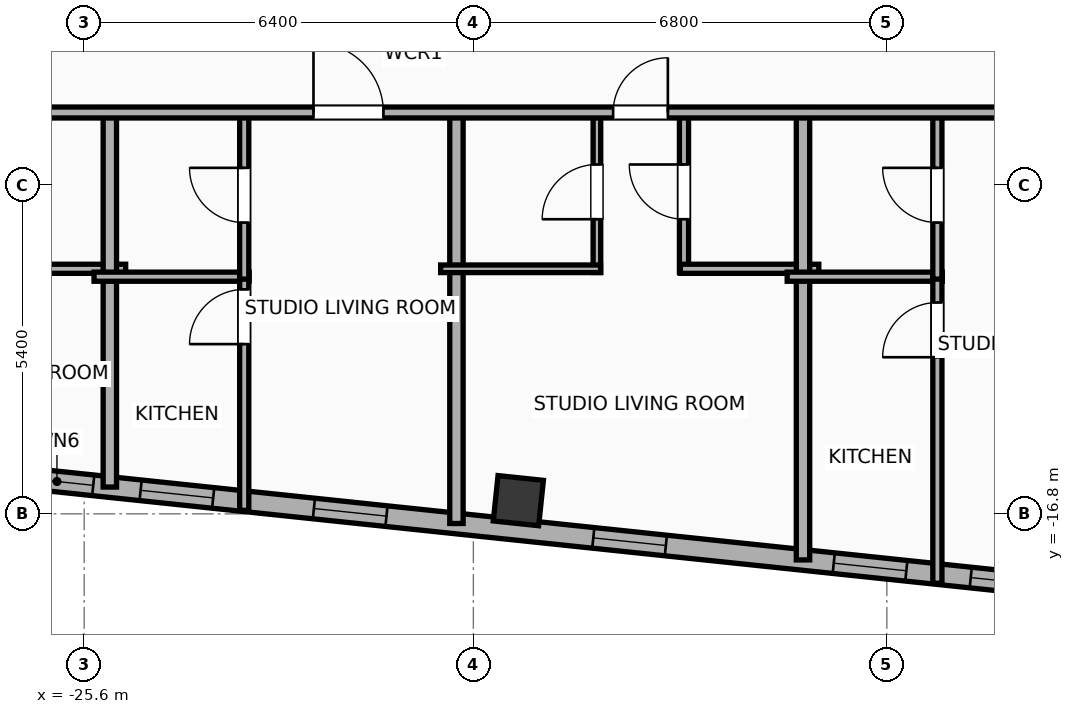
"""IFC4 building model, lengths in metres.
Left out: names, types, materials, properties, quantities, classifications, styles, units other than length and angle.
Written with IfcOpenShell. Run it as: python <this file> out.ifc"""

import sys

from ifc_helpers import new_model, si_unit, direction, frame, frame_2d, origin, origin_2d, place, context, subcontext, project, spatial, rectangle, hollow_rectangle, extrude, element, fill, save


model = new_model("IFC4")
c1 = context("Model", 3, precision=1e-05, world=origin(), true_north=direction((0.0, 1.0)))
c2 = subcontext(c1, "Body", "Model", "MODEL_VIEW")
j1 = project(units=[si_unit("LENGTHUNIT", "METRE"), si_unit("PLANEANGLEUNIT", "RADIAN")], contexts=[c1])
p1 = place(None, origin())
s1 = spatial("IfcSite", under=j1, at=p1, CompositionType="ELEMENT")
p2 = place(p1, origin())
s2 = spatial("IfcBuilding", under=s1, at=p2, CompositionType="ELEMENT")
p3 = place(p2, frame((0.0, 0.0, 295.1)))
s3 = spatial("IfcBuildingStorey", under=s2, at=p3, CompositionType="ELEMENT", Elevation=295.1)
p4 = place(p3, frame((-18.46, -16.583, 0.0), z_axis=(0.0, 0.0, 1.0), x_axis=(0.994521895368, -0.104528463268, 0.0)))
e1 = element("IfcColumn", 1, at=p4, inside=s3, PredefinedType="COLUMN", context=c2, shape_type="SweptSolid", body=[
    extrude(hollow_rectangle(XDim=0.75, YDim=0.75, WallThickness=0.025, at=origin_2d()), origin(), (0.0, 0.0, 1.0), 3.9),
])
p5 = place(p3, frame((18.708, -20.972, 0.0), z_axis=(0.0, 0.0, 1.0), x_axis=(-0.994521888554, 0.104528528102, 0.0)))
e2 = element("IfcWall", 2, at=p5, inside=s3, PredefinedType="ELEMENTEDWALL", context=c2, shape_type="SweptSolid", body=[
    extrude(rectangle(XDim=46.766, YDim=0.34, at=frame_2d((23.383, 0.0))), origin(), (0.0, 0.0, 1.0), 3.635),
])
p6 = place(p5, frame((23.733, 0.0, 0.65)))
e3 = element("IfcOpeningElement", 3, at=p6, cuts=e2, PredefinedType="OPENING", context=c2, shape_type="SweptSolid", body=[
    extrude(rectangle(XDim=2.6, YDim=2.45, at=frame_2d((1.3, 1.225))), frame((0.0, 0.18, 0.0), z_axis=(0.0, -1.0, 0.0), x_axis=(1.0, 0.0, 0.0)), (0.0, 0.0, 1.0), 0.36),
])
p7 = place(p5, frame((44.402, 0.0, 0.75)))
e4 = element("IfcOpeningElement", 4, at=p7, cuts=e2, PredefinedType="OPENING", context=c2, shape_type="SweptSolid", body=[
    extrude(rectangle(XDim=1.2, YDim=2.05, at=frame_2d((0.6, 1.025))), frame((0.0, 0.18, 0.0), z_axis=(0.0, -1.0, 0.0), x_axis=(1.0, 0.0, 0.0)), (0.0, 0.0, 1.0), 0.36),
])
p8 = place(p5, frame((39.553, 0.0, 0.75)))
e5 = element("IfcOpeningElement", 5, at=p8, cuts=e2, PredefinedType="OPENING", context=c2, shape_type="SweptSolid", body=[
    extrude(rectangle(XDim=1.2, YDim=2.05, at=frame_2d((0.6, 1.025))), frame((0.0, 0.18, 0.0), z_axis=(0.0, -1.0, 0.0), x_axis=(1.0, 0.0, 0.0)), (0.0, 0.0, 1.0), 0.36),
])
p9 = place(p5, frame((42.419, 0.0, 0.75)))
e6 = element("IfcOpeningElement", 6, at=p9, cuts=e2, PredefinedType="OPENING", context=c2, shape_type="SweptSolid", body=[
    extrude(rectangle(XDim=1.2, YDim=2.05, at=frame_2d((0.6, 1.025))), frame((0.0, 0.18, 0.0), z_axis=(0.0, -1.0, 0.0), x_axis=(1.0, 0.0, 0.0)), (0.0, 0.0, 1.0), 0.36),
])
p10 = place(p5, frame((34.933, 0.0, 0.75)))
e7 = element("IfcOpeningElement", 7, at=p10, cuts=e2, PredefinedType="OPENING", context=c2, shape_type="SweptSolid", body=[
    extrude(rectangle(XDim=1.2, YDim=2.05, at=frame_2d((0.6, 1.025))), frame((0.0, 0.18, 0.0), z_axis=(0.0, -1.0, 0.0), x_axis=(1.0, 0.0, 0.0)), (0.0, 0.0, 1.0), 0.36),
])
p11 = place(p5, frame((28.692, 0.0, 0.75)))
e8 = element("IfcOpeningElement", 8, at=p11, cuts=e2, PredefinedType="OPENING", context=c2, shape_type="SweptSolid", body=[
    extrude(rectangle(XDim=1.2, YDim=2.05, at=frame_2d((0.6, 1.025))), frame((0.0, 0.18, 0.0), z_axis=(0.0, -1.0, 0.0), x_axis=(1.0, 0.0, 0.0)), (0.0, 0.0, 1.0), 0.36),
])
p12 = place(p5, frame((30.957, 0.0, 0.75)))
e9 = element("IfcOpeningElement", 9, at=p12, cuts=e2, PredefinedType="OPENING", context=c2, shape_type="SweptSolid", body=[
    extrude(rectangle(XDim=1.2, YDim=2.05, at=frame_2d((0.6, 1.025))), frame((0.0, 0.18, 0.0), z_axis=(0.0, -1.0, 0.0), x_axis=(1.0, 0.0, 0.0)), (0.0, 0.0, 1.0), 0.36),
])
p13 = place(p5, frame((7.495, 0.0, 0.75)))
e10 = element("IfcOpeningElement", 10, at=p13, cuts=e2, PredefinedType="OPENING", context=c2, shape_type="SweptSolid", body=[
    extrude(rectangle(XDim=1.2, YDim=2.05, at=frame_2d((0.6, 1.025))), frame((0.0, 0.18, 0.0), z_axis=(0.0, -1.0, 0.0), x_axis=(1.0, 0.0, 0.0)), (0.0, 0.0, 1.0), 0.36),
])
p14 = place(p5, frame((4.146, 0.0, 0.75)))
e11 = element("IfcOpeningElement", 11, at=p14, cuts=e2, PredefinedType="OPENING", context=c2, shape_type="SweptSolid", body=[
    extrude(rectangle(XDim=1.2, YDim=2.05, at=frame_2d((0.6, 1.025))), frame((0.0, 0.18, 0.0), z_axis=(0.0, -1.0, 0.0), x_axis=(1.0, 0.0, 0.0)), (0.0, 0.0, 1.0), 0.36),
])
p15 = place(p5, frame((1.362, 0.0, 0.75)))
e12 = element("IfcOpeningElement", 12, at=p15, cuts=e2, PredefinedType="OPENING", context=c2, shape_type="SweptSolid", body=[
    extrude(rectangle(XDim=1.2, YDim=2.05, at=frame_2d((0.6, 1.025))), frame((0.0, 0.18, 0.0), z_axis=(0.0, -1.0, 0.0), x_axis=(1.0, 0.0, 0.0)), (0.0, 0.0, 1.0), 0.36),
])
p16 = place(p5, frame((20.254, 0.0, 0.75)))
e13 = element("IfcOpeningElement", 13, at=p16, cuts=e2, PredefinedType="OPENING", context=c2, shape_type="SweptSolid", body=[
    extrude(rectangle(XDim=1.2, YDim=2.05, at=frame_2d((0.6, 1.025))), frame((0.0, 0.18, 0.0), z_axis=(0.0, -1.0, 0.0), x_axis=(1.0, 0.0, 0.0)), (0.0, 0.0, 1.0), 0.36),
])
p17 = place(p5, frame((16.172, 0.0, 0.75)))
e14 = element("IfcOpeningElement", 14, at=p17, cuts=e2, PredefinedType="OPENING", context=c2, shape_type="SweptSolid", body=[
    extrude(rectangle(XDim=1.2, YDim=2.05, at=frame_2d((0.6, 1.025))), frame((0.0, 0.18, 0.0), z_axis=(0.0, -1.0, 0.0), x_axis=(1.0, 0.0, 0.0)), (0.0, 0.0, 1.0), 0.36),
])
p18 = place(p5, frame((12.11, 0.0, 0.75)))
e15 = element("IfcOpeningElement", 15, at=p18, cuts=e2, PredefinedType="OPENING", context=c2, shape_type="SweptSolid", body=[
    extrude(rectangle(XDim=1.2, YDim=2.05, at=frame_2d((0.6, 1.025))), frame((0.0, 0.18, 0.0), z_axis=(0.0, -1.0, 0.0), x_axis=(1.0, 0.0, 0.0)), (0.0, 0.0, 1.0), 0.36),
])
p19 = place(p3, frame((-27.215, -12.77, 0.0), z_axis=(0.0, 0.0, 1.0), x_axis=(1.0, 0.0, 0.0)))
e16 = element("IfcWall", 16, at=p19, inside=s3, PredefinedType="PLUMBINGWALL", context=c2, shape_type="SweptSolid", body=[
    extrude(rectangle(XDim=2.297, YDim=0.15, at=frame_2d((1.148, 0.0))), origin(), (0.0, 0.0, 1.0), 3.635),
])
p20 = place(p3, frame((-25.178, -16.36, 0.0), z_axis=(0.0, 0.0, 1.0), x_axis=(0.0, 1.0, 0.0)))
e17 = element("IfcWall", 17, at=p20, inside=s3, PredefinedType="PARTITIONING", context=c2, shape_type="SweptSolid", body=[
    extrude(rectangle(XDim=6.24, YDim=0.22, at=frame_2d((3.12, 0.0))), origin(), (0.0, 0.0, 1.0), 3.635),
])
p21 = place(p3, frame((-25.438, -12.9, 0.0), z_axis=(0.0, 0.0, 1.0), x_axis=(1.0, 0.0, 0.0)))
e18 = element("IfcWall", 18, at=p21, inside=s3, PredefinedType="PLUMBINGWALL", context=c2, shape_type="SweptSolid", body=[
    extrude(rectangle(XDim=2.55, YDim=0.15, at=frame_2d((1.275, 0.0))), origin(), (0.0, 0.0, 1.0), 3.635),
])
p22 = place(p3, frame((-22.968, -16.743, 0.0), z_axis=(0.0, 0.0, 1.0), x_axis=(0.0, 1.0, 0.0)))
e19 = element("IfcWall", 19, at=p22, inside=s3, PredefinedType="PLUMBINGWALL", context=c2, shape_type="SweptSolid", body=[
    extrude(rectangle(XDim=3.883, YDim=0.15, at=frame_2d((1.941, 0.0))), origin(), (0.0, 0.0, 1.0), 3.635),
])
p23 = place(p22, frame((2.734, 0.0, 0.0)))
e20 = element("IfcOpeningElement", 20, at=p23, cuts=e19, PredefinedType="OPENING", context=c2, shape_type="SweptSolid", body=[
    extrude(rectangle(XDim=0.9, YDim=2.05, at=frame_2d((0.45, 1.025))), frame((0.0, 0.085, 0.0), z_axis=(0.0, -1.0, 0.0), x_axis=(1.0, 0.0, 0.0)), (0.0, 0.0, 1.0), 0.17),
])
p24 = place(p3, frame((-22.968, -12.94, 0.0), z_axis=(0.0, 0.0, 1.0), x_axis=(0.0, 1.0, 0.0)))
e21 = element("IfcWall", 21, at=p24, inside=s3, PredefinedType="PLUMBINGWALL", context=c2, shape_type="SweptSolid", body=[
    extrude(rectangle(XDim=2.76, YDim=0.15, at=frame_2d((1.38, 0.0))), origin(), (0.0, 0.0, 1.0), 3.635),
])
p25 = place(p24, frame((0.93, 0.0, 0.0)))
e22 = element("IfcOpeningElement", 22, at=p25, cuts=e21, PredefinedType="OPENING", context=c2, shape_type="SweptSolid", body=[
    extrude(rectangle(XDim=0.9, YDim=2.05, at=frame_2d((0.45, 1.025))), frame((0.0, 0.085, 0.0), z_axis=(0.0, -1.0, 0.0), x_axis=(1.0, 0.0, 0.0)), (0.0, 0.0, 1.0), 0.17),
])
p26 = place(p3, frame((-19.478, -16.959, 0.0), z_axis=(0.0, 0.0, 1.0), x_axis=(0.0, 1.0, 0.0)))
e23 = element("IfcWall", 23, at=p26, inside=s3, PredefinedType="PARTITIONING", context=c2, shape_type="SweptSolid", body=[
    extrude(rectangle(XDim=6.839, YDim=0.22, at=frame_2d((3.419, 0.0))), origin(), (0.0, 0.0, 1.0), 3.635),
])
p27 = place(p3, frame((-17.168, -12.83, 0.0), z_axis=(0.0, 0.0, 1.0), x_axis=(0.0, 1.0, 0.0)))
e24 = element("IfcWall", 24, at=p27, inside=s3, PredefinedType="PARTITIONING", context=c2, shape_type="SweptSolid", body=[
    extrude(rectangle(XDim=2.65, YDim=0.125, at=frame_2d((1.325, 0.0))), origin(), (0.0, 0.0, 1.0), 3.635),
])
p28 = place(p27, frame((0.875, 0.0, 0.0)))
e25 = element("IfcOpeningElement", 25, at=p28, cuts=e24, PredefinedType="OPENING", context=c2, shape_type="SweptSolid", body=[
    extrude(rectangle(XDim=0.9, YDim=2.05, at=frame_2d((0.45, 1.025))), frame((0.0, 0.073, 0.0), z_axis=(0.0, -1.0, 0.0), x_axis=(1.0, 0.0, 0.0)), (0.0, 0.0, 1.0), 0.145),
])
p29 = place(p3, frame((-15.736, -12.83, 0.0), z_axis=(0.0, 0.0, 1.0), x_axis=(0.0, 1.0, 0.0)))
e26 = element("IfcWall", 26, at=p29, inside=s3, PredefinedType="PLUMBINGWALL", context=c2, shape_type="SweptSolid", body=[
    extrude(rectangle(XDim=2.65, YDim=0.15, at=frame_2d((1.325, 0.0))), origin(), (0.0, 0.0, 1.0), 3.635),
])
p30 = place(p29, frame((0.875, 0.0, 0.0)))
e27 = element("IfcOpeningElement", 27, at=p30, cuts=e26, PredefinedType="OPENING", context=c2, shape_type="SweptSolid", body=[
    extrude(rectangle(XDim=0.9, YDim=2.05, at=frame_2d((0.45, 1.025))), frame((0.0, 0.085, 0.0), z_axis=(0.0, -1.0, 0.0), x_axis=(1.0, 0.0, 0.0)), (0.0, 0.0, 1.0), 0.17),
])
p31 = place(p3, frame((-19.738, -12.77, 0.0), z_axis=(0.0, 0.0, 1.0), x_axis=(1.0, 0.0, 0.0)))
e28 = element("IfcWall", 28, at=p31, inside=s3, PredefinedType="PARTITIONING", context=c2, shape_type="SweptSolid", body=[
    extrude(rectangle(XDim=2.63, YDim=0.125, at=frame_2d((1.315, 0.0))), origin(), (0.0, 0.0, 1.0), 3.635),
])
p32 = place(p3, frame((-15.796, -12.77, 0.0), z_axis=(0.0, 0.0, 1.0), x_axis=(1.0, 0.0, 0.0)))
e29 = element("IfcWall", 29, at=p32, inside=s3, PredefinedType="PLUMBINGWALL", context=c2, shape_type="SweptSolid", body=[
    extrude(rectangle(XDim=2.277, YDim=0.15, at=frame_2d((1.138, 0.0))), origin(), (0.0, 0.0, 1.0), 3.635),
])
p33 = place(p3, frame((-13.779, -17.558, 0.0), z_axis=(0.0, 0.0, 1.0), x_axis=(0.0, 1.0, 0.0)))
e30 = element("IfcWall", 30, at=p33, inside=s3, PredefinedType="PARTITIONING", context=c2, shape_type="SweptSolid", body=[
    extrude(rectangle(XDim=7.438, YDim=0.22, at=frame_2d((3.719, 0.0))), origin(), (0.0, 0.0, 1.0), 3.635),
])
p34 = place(p3, frame((-14.039, -12.9, 0.0), z_axis=(0.0, 0.0, 1.0), x_axis=(1.0, 0.0, 0.0)))
e31 = element("IfcWall", 31, at=p34, inside=s3, PredefinedType="PLUMBINGWALL", context=c2, shape_type="SweptSolid", body=[
    extrude(rectangle(XDim=2.55, YDim=0.15, at=frame_2d((1.275, 0.0))), origin(), (0.0, 0.0, 1.0), 3.635),
])
p35 = place(p3, frame((-11.569, -17.941, 0.0), z_axis=(0.0, 0.0, 1.0), x_axis=(0.0, 1.0, 0.0)))
e32 = element("IfcWall", 32, at=p35, inside=s3, PredefinedType="PLUMBINGWALL", context=c2, shape_type="SweptSolid", body=[
    extrude(rectangle(XDim=5.081, YDim=0.15, at=frame_2d((2.541, 0.0))), origin(), (0.0, 0.0, 1.0), 3.635),
])
p36 = place(p35, frame((3.716, 0.0, 0.0)))
e33 = element("IfcOpeningElement", 33, at=p36, cuts=e32, PredefinedType="OPENING", context=c2, shape_type="SweptSolid", body=[
    extrude(rectangle(XDim=0.9, YDim=2.05, at=frame_2d((0.45, 1.025))), frame((0.0, 0.085, 0.0), z_axis=(0.0, -1.0, 0.0), x_axis=(1.0, 0.0, 0.0)), (0.0, 0.0, 1.0), 0.17),
])
p37 = place(p3, frame((-11.569, -12.94, 0.0), z_axis=(0.0, 0.0, 1.0), x_axis=(0.0, 1.0, 0.0)))
e34 = element("IfcWall", 34, at=p37, inside=s3, PredefinedType="PLUMBINGWALL", context=c2, shape_type="SweptSolid", body=[
    extrude(rectangle(XDim=2.76, YDim=0.15, at=frame_2d((1.38, 0.0))), origin(), (0.0, 0.0, 1.0), 3.075),
])
p38 = place(p37, frame((0.93, 0.0, 0.0)))
e35 = element("IfcOpeningElement", 35, at=p38, cuts=e34, PredefinedType="OPENING", context=c2, shape_type="SweptSolid", body=[
    extrude(rectangle(XDim=0.9, YDim=2.05, at=frame_2d((0.45, 1.025))), frame((0.0, 0.085, 0.0), z_axis=(0.0, -1.0, 0.0), x_axis=(1.0, 0.0, 0.0)), (0.0, 0.0, 1.0), 0.17),
])
p39 = place(p3, frame((-30.65, -10.2, 0.0), z_axis=(0.0, 0.0, 1.0), x_axis=(1.0, 0.0, 0.0)))
e36 = element("IfcWall", 36, at=p39, inside=s3, PredefinedType="PARTITIONING", context=c2, shape_type="SweptSolid", body=[
    extrude(rectangle(XDim=22.57, YDim=0.18, at=frame_2d((11.285, 0.0))), origin(), (0.0, 0.0, 1.0), 3.635),
])
p40 = place(p39, frame((2.308, 0.0, 0.0)))
e37 = element("IfcOpeningElement", 37, at=p40, cuts=e36, PredefinedType="OPENING", context=c2, shape_type="SweptSolid", body=[
    extrude(rectangle(XDim=0.9, YDim=2.05, at=frame_2d((0.45, 1.025))), frame((0.0, 0.1, 0.0), z_axis=(0.0, -1.0, 0.0), x_axis=(1.0, 0.0, 0.0)), (0.0, 0.0, 1.0), 0.2),
])
p41 = place(p39, frame((8.821, 0.0, 0.0)))
e38 = element("IfcOpeningElement", 38, at=p41, cuts=e36, PredefinedType="OPENING", context=c2, shape_type="SweptSolid", body=[
    extrude(rectangle(XDim=1.15, YDim=2.05, at=frame_2d((0.575, 1.025))), frame((0.0, 0.1, 0.0), z_axis=(0.0, -1.0, 0.0), x_axis=(1.0, 0.0, 0.0)), (0.0, 0.0, 1.0), 0.2),
])
p42 = place(p39, frame((13.749, 0.0, 0.0)))
e39 = element("IfcOpeningElement", 39, at=p42, cuts=e36, PredefinedType="OPENING", context=c2, shape_type="SweptSolid", body=[
    extrude(rectangle(XDim=0.9, YDim=2.05, at=frame_2d((0.45, 1.025))), frame((0.0, 0.1, 0.0), z_axis=(0.0, -1.0, 0.0), x_axis=(1.0, 0.0, 0.0)), (0.0, 0.0, 1.0), 0.2),
])
p43 = place(p39, frame((20.221, 0.0, 0.0)))
e40 = element("IfcOpeningElement", 40, at=p43, cuts=e36, PredefinedType="OPENING", context=c2, shape_type="SweptSolid", body=[
    extrude(rectangle(XDim=1.15, YDim=2.05, at=frame_2d((0.575, 1.025))), frame((0.0, 0.1, 0.0), z_axis=(0.0, -1.0, 0.0), x_axis=(1.0, 0.0, 0.0)), (0.0, 0.0, 1.0), 0.2),
])
p44 = place(p7, origin())
e41 = element("IfcWindow", 41, at=p44, inside=s3, PartitioningType="SINGLE_PANEL", PredefinedType="WINDOW", context=c2, shape_type="SweptSolid", body=[
    extrude(rectangle(XDim=1.2, YDim=2.05, at=frame_2d((0.6, 1.025))), frame((0.0, 0.03, 0.0), z_axis=(0.0, -1.0, 0.0), x_axis=(1.0, 0.0, 0.0)), (0.0, 0.0, 1.0), 0.06),
])
fill(e4, e41)
p45 = place(p8, origin())
e42 = element("IfcWindow", 42, at=p45, inside=s3, PartitioningType="SINGLE_PANEL", PredefinedType="WINDOW", context=c2, shape_type="SweptSolid", body=[
    extrude(rectangle(XDim=1.2, YDim=2.05, at=frame_2d((0.6, 1.025))), frame((0.0, 0.03, 0.0), z_axis=(0.0, -1.0, 0.0), x_axis=(1.0, 0.0, 0.0)), (0.0, 0.0, 1.0), 0.06),
])
fill(e5, e42)
p46 = place(p9, origin())
e43 = element("IfcWindow", 43, at=p46, inside=s3, PartitioningType="SINGLE_PANEL", PredefinedType="WINDOW", context=c2, shape_type="SweptSolid", body=[
    extrude(rectangle(XDim=1.2, YDim=2.05, at=frame_2d((0.6, 1.025))), frame((0.0, 0.03, 0.0), z_axis=(0.0, -1.0, 0.0), x_axis=(1.0, 0.0, 0.0)), (0.0, 0.0, 1.0), 0.06),
])
fill(e6, e43)
p47 = place(p10, origin())
e44 = element("IfcWindow", 44, at=p47, inside=s3, PartitioningType="SINGLE_PANEL", PredefinedType="WINDOW", context=c2, shape_type="SweptSolid", body=[
    extrude(rectangle(XDim=1.2, YDim=2.05, at=frame_2d((0.6, 1.025))), frame((0.0, 0.03, 0.0), z_axis=(0.0, -1.0, 0.0), x_axis=(1.0, 0.0, 0.0)), (0.0, 0.0, 1.0), 0.06),
])
fill(e7, e44)
p48 = place(p11, origin())
e45 = element("IfcWindow", 45, at=p48, inside=s3, PartitioningType="SINGLE_PANEL", PredefinedType="WINDOW", context=c2, shape_type="SweptSolid", body=[
    extrude(rectangle(XDim=1.2, YDim=2.05, at=frame_2d((0.6, 1.025))), frame((0.0, 0.03, 0.0), z_axis=(0.0, -1.0, 0.0), x_axis=(1.0, 0.0, 0.0)), (0.0, 0.0, 1.0), 0.06),
])
fill(e8, e45)
p49 = place(p12, origin())
e46 = element("IfcWindow", 46, at=p49, inside=s3, PartitioningType="SINGLE_PANEL", PredefinedType="WINDOW", context=c2, shape_type="SweptSolid", body=[
    extrude(rectangle(XDim=1.2, YDim=2.05, at=frame_2d((0.6, 1.025))), frame((0.0, 0.03, 0.0), z_axis=(0.0, -1.0, 0.0), x_axis=(1.0, 0.0, 0.0)), (0.0, 0.0, 1.0), 0.06),
])
fill(e9, e46)
p50 = place(p23, origin())
e47 = element("IfcDoor", 47, at=p50, inside=s3, OperationType="SINGLE_SWING_LEFT", PredefinedType="DOOR", context=c2, shape_type="SweptSolid", body=[
    extrude(rectangle(XDim=0.9, YDim=2.05, at=frame_2d((0.45, 1.025))), frame((0.0, 0.025, 0.0), z_axis=(0.0, -1.0, 0.0), x_axis=(1.0, 0.0, 0.0)), (0.0, 0.0, 1.0), 0.05),
])
fill(e20, e47)
p51 = place(p25, origin())
e48 = element("IfcDoor", 48, at=p51, inside=s3, OperationType="SINGLE_SWING_RIGHT", PredefinedType="DOOR", context=c2, shape_type="SweptSolid", body=[
    extrude(rectangle(XDim=0.9, YDim=2.05, at=frame_2d((0.45, 1.025))), frame((0.0, 0.025, 0.0), z_axis=(0.0, -1.0, 0.0), x_axis=(1.0, 0.0, 0.0)), (0.0, 0.0, 1.0), 0.05),
])
fill(e22, e48)
p52 = place(p28, origin())
e49 = element("IfcDoor", 49, at=p52, inside=s3, OperationType="SINGLE_SWING_LEFT", PredefinedType="DOOR", context=c2, shape_type="SweptSolid", body=[
    extrude(rectangle(XDim=0.9, YDim=2.05, at=frame_2d((0.45, 1.025))), frame((0.0, 0.025, 0.0), z_axis=(0.0, -1.0, 0.0), x_axis=(1.0, 0.0, 0.0)), (0.0, 0.0, 1.0), 0.05),
])
fill(e25, e49)
p53 = place(p30, origin())
e50 = element("IfcDoor", 50, at=p53, inside=s3, OperationType="SINGLE_SWING_RIGHT", PredefinedType="DOOR", context=c2, shape_type="SweptSolid", body=[
    extrude(rectangle(XDim=0.9, YDim=2.05, at=frame_2d((0.45, 1.025))), frame((0.0, 0.025, 0.0), z_axis=(0.0, -1.0, 0.0), x_axis=(1.0, 0.0, 0.0)), (0.0, 0.0, 1.0), 0.05),
])
fill(e27, e50)
p54 = place(p36, origin())
e51 = element("IfcDoor", 51, at=p54, inside=s3, OperationType="SINGLE_SWING_LEFT", PredefinedType="DOOR", context=c2, shape_type="SweptSolid", body=[
    extrude(rectangle(XDim=0.9, YDim=2.05, at=frame_2d((0.45, 1.025))), frame((0.0, 0.025, 0.0), z_axis=(0.0, -1.0, 0.0), x_axis=(1.0, 0.0, 0.0)), (0.0, 0.0, 1.0), 0.05),
])
fill(e33, e51)
p55 = place(p38, origin())
e52 = element("IfcDoor", 52, at=p55, inside=s3, OperationType="SINGLE_SWING_RIGHT", PredefinedType="DOOR", context=c2, shape_type="SweptSolid", body=[
    extrude(rectangle(XDim=0.9, YDim=2.05, at=frame_2d((0.45, 1.025))), frame((0.0, 0.025, 0.0), z_axis=(0.0, -1.0, 0.0), x_axis=(1.0, 0.0, 0.0)), (0.0, 0.0, 1.0), 0.05),
])
fill(e35, e52)
p56 = place(p41, origin())
e53 = element("IfcDoor", 53, at=p56, inside=s3, OperationType="SINGLE_SWING_LEFT", PredefinedType="DOOR", context=c2, shape_type="SweptSolid", body=[
    extrude(rectangle(XDim=1.15, YDim=2.05, at=frame_2d((0.575, 1.025))), frame((0.0, 0.025, 0.0), z_axis=(0.0, -1.0, 0.0), x_axis=(1.0, 0.0, 0.0)), (0.0, 0.0, 1.0), 0.05),
])
fill(e38, e53)
p57 = place(p42, origin())
e54 = element("IfcDoor", 54, at=p57, inside=s3, OperationType="SINGLE_SWING_RIGHT", PredefinedType="DOOR", context=c2, shape_type="SweptSolid", body=[
    extrude(rectangle(XDim=0.9, YDim=2.05, at=frame_2d((0.45, 1.025))), frame((0.0, 0.025, 0.0), z_axis=(0.0, -1.0, 0.0), x_axis=(1.0, 0.0, 0.0)), (0.0, 0.0, 1.0), 0.05),
])
fill(e39, e54)
save(model, sys.argv[1])
